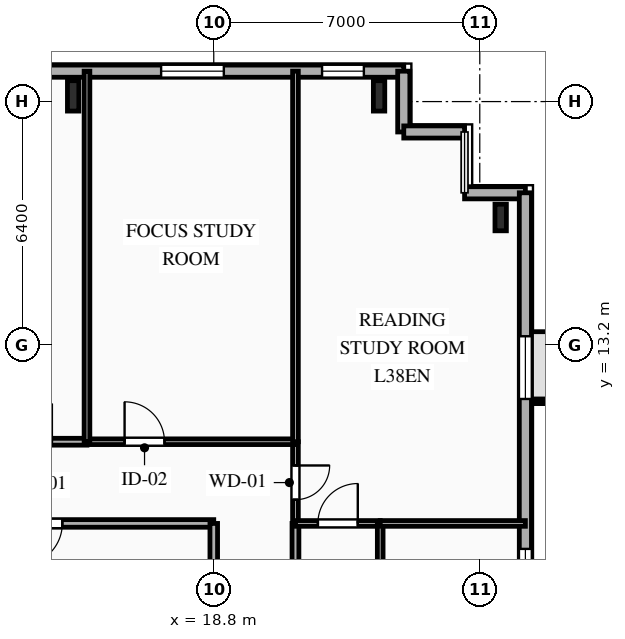
"""IFC4 building model, lengths in metres.
Left out: names, types, materials, properties, quantities, classifications, styles, units other than length and angle.
Written with IfcOpenShell. Run it as: python <this file> out.ifc"""

import sys

from ifc_helpers import new_model, si_unit, direction, frame, frame_2d, origin, origin_2d, place, context, subcontext, project, spatial, rectangle, i_section, extrude, element, fill, save


model = new_model("IFC4")
c1 = context("Model", 3, precision=1e-05, world=origin(), true_north=direction((0.0, 1.0)))
c2 = subcontext(c1, "Body", "Model", "MODEL_VIEW")
j1 = project(units=[si_unit("LENGTHUNIT", "METRE"), si_unit("PLANEANGLEUNIT", "RADIAN")], contexts=[c1])
p1 = place(None, origin())
s1 = spatial("IfcSite", under=j1, at=p1, CompositionType="ELEMENT")
p2 = place(p1, origin())
s2 = spatial("IfcBuilding", under=s1, at=p2, CompositionType="ELEMENT")
p3 = place(p2, frame((0.0, 0.0, 137.7)))
s3 = spatial("IfcBuildingStorey", under=s2, at=p3, CompositionType="ELEMENT", Elevation=137.7)
for number, where, z_axis, x_axis in (
    (1, (23.15, 19.75, 0.0), (0.0, 0.0, 1.0), (1.0, 0.0, 0.0)),
    (2, (15.1, 19.75, 0.0), (0.0, 0.0, 1.0), (1.0, 0.0, 0.0)),
):
    element("IfcColumn", number, at=place(p3, frame(where, z_axis=z_axis, x_axis=x_axis)), inside=s3, PredefinedType="COLUMN", context=c2, shape_type="SweptSolid", body=[
        extrude(i_section(OverallWidth=0.3, OverallDepth=0.8, WebThickness=0.018, FlangeThickness=0.033, FilletRadius=0.03, at=origin_2d()), origin(), (0.0, 0.0, 1.0), 3.35),
    ])
p4 = place(p3, frame((26.35, 16.55, 0.0), z_axis=(0.0, 0.0, 1.0), x_axis=(1.0, 0.0, 0.0)))
e3 = element("IfcColumn", 3, at=p4, inside=s3, PredefinedType="COLUMN", context=c2, shape_type="SweptSolid", body=[
    extrude(i_section(OverallWidth=0.3, OverallDepth=0.7, WebThickness=0.017, FlangeThickness=0.032, FilletRadius=0.027, at=origin_2d()), origin(), (0.0, 0.0, 1.0), 3.35),
])
p5 = place(p3, frame((-25.8, 20.4, 0.0), z_axis=(0.0, 0.0, 1.0), x_axis=(1.0, 0.0, 0.0)))
e4 = element("IfcWall", 4, at=p5, inside=s3, PredefinedType="SOLIDWALL", context=c2, shape_type="SweptSolid", body=[
    extrude(rectangle(XDim=49.6, YDim=0.32, at=frame_2d((24.8, 0.0))), origin(), (0.0, 0.0, 1.0), 3.04),
])
p6 = place(p5, frame((2.135, 0.0, 0.85)))
e5 = element("IfcOpeningElement", 5, at=p6, cuts=e4, PredefinedType="OPENING", context=c2, shape_type="SweptSolid", body=[
    extrude(rectangle(XDim=1.65, YDim=1.85, at=frame_2d((0.825, 0.925))), frame((0.0, 0.17, 0.0), z_axis=(0.0, -1.0, 0.0), x_axis=(1.0, 0.0, 0.0)), (0.0, 0.0, 1.0), 0.34),
])
p7 = place(p5, frame((6.706, 0.0, 0.85)))
e6 = element("IfcOpeningElement", 6, at=p7, cuts=e4, PredefinedType="OPENING", context=c2, shape_type="SweptSolid", body=[
    extrude(rectangle(XDim=1.65, YDim=1.85, at=frame_2d((0.825, 0.925))), frame((0.0, 0.17, 0.0), z_axis=(0.0, -1.0, 0.0), x_axis=(1.0, 0.0, 0.0)), (0.0, 0.0, 1.0), 0.34),
])
p8 = place(p5, frame((14.81, 0.0, 0.85)))
e7 = element("IfcOpeningElement", 7, at=p8, cuts=e4, PredefinedType="OPENING", context=c2, shape_type="SweptSolid", body=[
    extrude(rectangle(XDim=1.5, YDim=1.85, at=frame_2d((0.75, 0.925))), frame((0.0, 0.17, 0.0), z_axis=(0.0, -1.0, 0.0), x_axis=(1.0, 0.0, 0.0)), (0.0, 0.0, 1.0), 0.34),
])
p9 = place(p5, frame((19.26, 0.0, 0.85)))
e8 = element("IfcOpeningElement", 8, at=p9, cuts=e4, PredefinedType="OPENING", context=c2, shape_type="SweptSolid", body=[
    extrude(rectangle(XDim=2.2, YDim=1.85, at=frame_2d((1.1, 0.925))), frame((0.0, 0.17, 0.0), z_axis=(0.0, -1.0, 0.0), x_axis=(1.0, 0.0, 0.0)), (0.0, 0.0, 1.0), 0.34),
])
p10 = place(p5, frame((25.26, 0.0, 0.85)))
e9 = element("IfcOpeningElement", 9, at=p10, cuts=e4, PredefinedType="OPENING", context=c2, shape_type="SweptSolid", body=[
    extrude(rectangle(XDim=2.2, YDim=1.85, at=frame_2d((1.1, 0.925))), frame((0.0, 0.17, 0.0), z_axis=(0.0, -1.0, 0.0), x_axis=(1.0, 0.0, 0.0)), (0.0, 0.0, 1.0), 0.34),
])
p11 = place(p5, frame((30.4, 0.0, 0.85)))
e10 = element("IfcOpeningElement", 10, at=p11, cuts=e4, PredefinedType="OPENING", context=c2, shape_type="SweptSolid", body=[
    extrude(rectangle(XDim=2.2, YDim=1.85, at=frame_2d((1.1, 0.925))), frame((0.0, 0.17, 0.0), z_axis=(0.0, -1.0, 0.0), x_axis=(1.0, 0.0, 0.0)), (0.0, 0.0, 1.0), 0.34),
])
p12 = place(p5, frame((37.18, 0.0, 0.85)))
e11 = element("IfcOpeningElement", 11, at=p12, cuts=e4, PredefinedType="OPENING", context=c2, shape_type="SweptSolid", body=[
    extrude(rectangle(XDim=2.2, YDim=1.85, at=frame_2d((1.1, 0.925))), frame((0.0, 0.17, 0.0), z_axis=(0.0, -1.0, 0.0), x_axis=(1.0, 0.0, 0.0)), (0.0, 0.0, 1.0), 0.34),
])
p13 = place(p5, frame((43.215, 0.0, 0.85)))
e12 = element("IfcOpeningElement", 12, at=p13, cuts=e4, PredefinedType="OPENING", context=c2, shape_type="SweptSolid", body=[
    extrude(rectangle(XDim=1.65, YDim=1.85, at=frame_2d((0.825, 0.925))), frame((0.0, 0.17, 0.0), z_axis=(0.0, -1.0, 0.0), x_axis=(1.0, 0.0, 0.0)), (0.0, 0.0, 1.0), 0.34),
])
p14 = place(p5, frame((47.45, 0.0, 0.85)))
e13 = element("IfcOpeningElement", 13, at=p14, cuts=e4, PredefinedType="OPENING", context=c2, shape_type="SweptSolid", body=[
    extrude(rectangle(XDim=1.1, YDim=1.85, at=frame_2d((0.55, 0.925))), frame((0.0, 0.17, 0.0), z_axis=(0.0, -1.0, 0.0), x_axis=(1.0, 0.0, 0.0)), (0.0, 0.0, 1.0), 0.34),
])
for number, where, z_axis, x_axis in (
    (14, (23.8, 20.4, 0.0), (0.0, 0.0, 1.0), (0.0, -1.0, 0.0)),
    (15, (23.8, 18.8, 0.0), (0.0, 0.0, 1.0), (1.0, 0.0, 0.0)),
):
    element("IfcWall", number, at=place(p3, frame(where, z_axis=z_axis, x_axis=x_axis)), inside=s3, PredefinedType="SOLIDWALL", context=c2, shape_type="SweptSolid", body=[
        extrude(rectangle(XDim=1.6, YDim=0.32, at=frame_2d((0.8, 0.0))), origin(), (0.0, 0.0, 1.0), 3.04),
    ])
p15 = place(p3, frame((25.4, 17.2, 0.0), z_axis=(0.0, 0.0, 1.0), x_axis=(1.0, 0.0, 0.0)))
e16 = element("IfcWall", 16, at=p15, inside=s3, PredefinedType="SOLIDWALL", context=c2, shape_type="SweptSolid", body=[
    extrude(rectangle(XDim=1.6, YDim=0.32, at=frame_2d((0.8, 0.0))), origin(), (0.0, 0.0, 1.0), 3.04),
])
p16 = place(p3, frame((27.0, 17.2, 0.0), z_axis=(0.0, 0.0, 1.0), x_axis=(0.0, -1.0, 0.0)))
e17 = element("IfcWall", 17, at=p16, inside=s3, PredefinedType="SOLIDWALL", context=c2, shape_type="SweptSolid", body=[
    extrude(rectangle(XDim=29.6, YDim=0.32, at=frame_2d((14.8, 0.0))), origin(), (0.0, 0.0, 1.0), 3.04),
])
p17 = place(p16, frame((3.775, 0.0, 0.85)))
e18 = element("IfcOpeningElement", 18, at=p17, cuts=e17, PredefinedType="OPENING", context=c2, shape_type="SweptSolid", body=[
    extrude(rectangle(XDim=1.65, YDim=1.85, at=frame_2d((0.825, 0.925))), frame((0.0, 0.17, 0.0), z_axis=(0.0, -1.0, 0.0), x_axis=(1.0, 0.0, 0.0)), (0.0, 0.0, 1.0), 0.34),
])
p18 = place(p16, frame((9.37, 0.0, 0.85)))
e19 = element("IfcOpeningElement", 19, at=p18, cuts=e17, PredefinedType="OPENING", context=c2, shape_type="SweptSolid", body=[
    extrude(rectangle(XDim=1.5, YDim=1.85, at=frame_2d((0.75, 0.925))), frame((0.0, 0.17, 0.0), z_axis=(0.0, -1.0, 0.0), x_axis=(1.0, 0.0, 0.0)), (0.0, 0.0, 1.0), 0.34),
])
p19 = place(p16, frame((12.25, 0.0, 0.85)))
e20 = element("IfcOpeningElement", 20, at=p19, cuts=e17, PredefinedType="OPENING", context=c2, shape_type="SweptSolid", body=[
    extrude(rectangle(XDim=1.5, YDim=1.85, at=frame_2d((0.75, 0.925))), frame((0.0, 0.17, 0.0), z_axis=(0.0, -1.0, 0.0), x_axis=(1.0, 0.0, 0.0)), (0.0, 0.0, 1.0), 0.34),
])
p20 = place(p16, frame((15.05, 0.0, 0.85)))
e21 = element("IfcOpeningElement", 21, at=p20, cuts=e17, PredefinedType="OPENING", context=c2, shape_type="SweptSolid", body=[
    extrude(rectangle(XDim=1.5, YDim=1.85, at=frame_2d((0.75, 0.925))), frame((0.0, 0.17, 0.0), z_axis=(0.0, -1.0, 0.0), x_axis=(1.0, 0.0, 0.0)), (0.0, 0.0, 1.0), 0.34),
])
p21 = place(p16, frame((17.865, 0.0, 0.85)))
e22 = element("IfcOpeningElement", 22, at=p21, cuts=e17, PredefinedType="OPENING", context=c2, shape_type="SweptSolid", body=[
    extrude(rectangle(XDim=1.95, YDim=1.85, at=frame_2d((0.975, 0.925))), frame((0.0, 0.17, 0.0), z_axis=(0.0, -1.0, 0.0), x_axis=(1.0, 0.0, 0.0)), (0.0, 0.0, 1.0), 0.34),
])
p22 = place(p16, frame((25.175, 0.0, 0.85)))
e23 = element("IfcOpeningElement", 23, at=p22, cuts=e17, PredefinedType="OPENING", context=c2, shape_type="SweptSolid", body=[
    extrude(rectangle(XDim=1.65, YDim=1.85, at=frame_2d((0.825, 0.925))), frame((0.0, 0.17, 0.0), z_axis=(0.0, -1.0, 0.0), x_axis=(1.0, 0.0, 0.0)), (0.0, 0.0, 1.0), 0.34),
])
p23 = place(p3, frame((18.8, 8.5, 0.0), z_axis=(0.0, 0.0, 1.0), x_axis=(-1.0, 0.0, 0.0)))
e24 = element("IfcWall", 24, at=p23, inside=s3, PredefinedType="PARTITIONING", context=c2, shape_type="SweptSolid", body=[
    extrude(rectangle(XDim=6.8, YDim=0.2, at=frame_2d((3.4, 0.0))), origin(), (0.0, 0.0, 1.0), 3.04),
])
p24 = place(p23, frame((3.985, 0.0, 0.0)))
e25 = element("IfcOpeningElement", 25, at=p24, cuts=e24, PredefinedType="OPENING", context=c2, shape_type="SweptSolid", body=[
    extrude(rectangle(XDim=1.1, YDim=2.15, at=frame_2d((0.55, 1.075))), frame((0.0, 0.11, 0.0), z_axis=(0.0, -1.0, 0.0), x_axis=(1.0, 0.0, 0.0)), (0.0, 0.0, 1.0), 0.22),
])
p25 = place(p3, frame((18.8, 5.6, 0.0), z_axis=(0.0, 0.0, 1.0), x_axis=(0.0, 1.0, 0.0)))
e26 = element("IfcWall", 26, at=p25, inside=s3, PredefinedType="PARTITIONING", context=c2, shape_type="SweptSolid", body=[
    extrude(rectangle(XDim=2.9, YDim=0.2, at=frame_2d((1.45, 0.0))), origin(), (0.0, 0.0, 1.0), 2.525),
])
p26 = place(p3, frame((20.95, 10.65, 0.0), z_axis=(0.0, 0.0, 1.0), x_axis=(0.0, -1.0, 0.0)))
e27 = element("IfcWall", 27, at=p26, inside=s3, PredefinedType="PARTITIONING", context=c2, shape_type="SweptSolid", body=[
    extrude(rectangle(XDim=2.15, YDim=0.15, at=frame_2d((1.075, 0.0))), origin(), (0.0, 0.0, 1.0), 3.04),
])
p27 = place(p26, frame((0.625, 0.0, 0.0)))
e28 = element("IfcOpeningElement", 28, at=p27, cuts=e27, PredefinedType="OPENING", context=c2, shape_type="SweptSolid", body=[
    extrude(rectangle(XDim=0.9, YDim=2.1, at=frame_2d((0.45, 1.05))), frame((0.0, 0.085, 0.0), z_axis=(0.0, -1.0, 0.0), x_axis=(1.0, 0.0, 0.0)), (0.0, 0.0, 1.0), 0.17),
])
p28 = place(p3, frame((11.929, 10.65, 0.0), z_axis=(0.0, 0.0, 1.0), x_axis=(1.0, 0.0, 0.0)))
e29 = element("IfcWall", 29, at=p28, inside=s3, PredefinedType="PARTITIONING", context=c2, shape_type="SweptSolid", body=[
    extrude(rectangle(XDim=3.535, YDim=0.18, at=frame_2d((1.768, 0.0))), origin(), (0.0, 0.0, 1.0), 3.04),
])
p29 = place(p28, frame((1.611, 0.0, 0.0)))
e30 = element("IfcOpeningElement", 30, at=p29, cuts=e29, PredefinedType="OPENING", context=c2, shape_type="SweptSolid", body=[
    extrude(rectangle(XDim=1.0, YDim=2.15, at=frame_2d((0.5, 1.075))), frame((0.0, 0.1, 0.0), z_axis=(0.0, -1.0, 0.0), x_axis=(1.0, 0.0, 0.0)), (0.0, 0.0, 1.0), 0.2),
])
p30 = place(p3, frame((15.464, 10.65, 0.0), z_axis=(0.0, 0.0, 1.0), x_axis=(1.0, 0.0, 0.0)))
e31 = element("IfcWall", 31, at=p30, inside=s3, PredefinedType="PARTITIONING", context=c2, shape_type="SweptSolid", body=[
    extrude(rectangle(XDim=5.486, YDim=0.15, at=frame_2d((2.743, 0.0))), origin(), (0.0, 0.0, 1.0), 3.04),
])
p31 = place(p30, frame((0.99, 0.0, 0.0)))
e32 = element("IfcOpeningElement", 32, at=p31, cuts=e31, PredefinedType="OPENING", context=c2, shape_type="SweptSolid", body=[
    extrude(rectangle(XDim=1.05, YDim=2.15, at=frame_2d((0.525, 1.075))), frame((0.0, 0.085, 0.0), z_axis=(0.0, -1.0, 0.0), x_axis=(1.0, 0.0, 0.0)), (0.0, 0.0, 1.0), 0.17),
])
p32 = place(p3, frame((20.95, 8.5, 0.0), z_axis=(0.0, 0.0, 1.0), x_axis=(0.0, -1.0, 0.0)))
e33 = element("IfcWall", 33, at=p32, inside=s3, PredefinedType="PARTITIONING", context=c2, shape_type="SweptSolid", body=[
    extrude(rectangle(XDim=14.1, YDim=0.18, at=frame_2d((7.05, 0.0))), origin(), (0.0, 0.0, 1.0), 3.04),
])
p33 = place(p32, frame((8.042, 0.0, 0.0)))
e34 = element("IfcOpeningElement", 34, at=p33, cuts=e33, PredefinedType="OPENING", context=c2, shape_type="SweptSolid", body=[
    extrude(rectangle(XDim=1.0, YDim=2.15, at=frame_2d((0.5, 1.075))), frame((0.0, 0.1, 0.0), z_axis=(0.0, -1.0, 0.0), x_axis=(1.0, 0.0, 0.0)), (0.0, 0.0, 1.0), 0.2),
])
p34 = place(p3, frame((20.95, 8.5, 0.0), z_axis=(0.0, 0.0, 1.0), x_axis=(1.0, 0.0, 0.0)))
e35 = element("IfcWall", 35, at=p34, inside=s3, PredefinedType="PARTITIONING", context=c2, shape_type="SweptSolid", body=[
    extrude(rectangle(XDim=2.23, YDim=0.15, at=frame_2d((1.115, 0.0))), origin(), (0.0, 0.0, 1.0), 3.04),
])
p35 = place(p34, frame((0.59, 0.0, 0.0)))
e36 = element("IfcOpeningElement", 36, at=p35, cuts=e35, PredefinedType="OPENING", context=c2, shape_type="SweptSolid", body=[
    extrude(rectangle(XDim=1.05, YDim=2.15, at=frame_2d((0.525, 1.075))), frame((0.0, 0.085, 0.0), z_axis=(0.0, -1.0, 0.0), x_axis=(1.0, 0.0, 0.0)), (0.0, 0.0, 1.0), 0.17),
])
p36 = place(p3, frame((23.18, 8.5, 0.0), z_axis=(0.0, 0.0, 1.0), x_axis=(0.0, -1.0, 0.0)))
e37 = element("IfcWall", 37, at=p36, inside=s3, PredefinedType="PARTITIONING", context=c2, shape_type="SweptSolid", body=[
    extrude(rectangle(XDim=2.82, YDim=0.15, at=frame_2d((1.41, 0.0))), origin(), (0.0, 0.0, 1.0), 3.04),
])
p37 = place(p36, frame((1.201, 0.0, 0.0)))
e38 = element("IfcOpeningElement", 38, at=p37, cuts=e37, PredefinedType="OPENING", context=c2, shape_type="SweptSolid", body=[
    extrude(rectangle(XDim=0.95, YDim=2.1, at=frame_2d((0.475, 1.05))), frame((0.0, 0.085, 0.0), z_axis=(0.0, -1.0, 0.0), x_axis=(1.0, 0.0, 0.0)), (0.0, 0.0, 1.0), 0.17),
])
p38 = place(p3, frame((27.0, 8.5, 0.0), z_axis=(0.0, 0.0, 1.0), x_axis=(-1.0, 0.0, 0.0)))
e39 = element("IfcWall", 39, at=p38, inside=s3, PredefinedType="PARTITIONING", context=c2, shape_type="SweptSolid", body=[
    extrude(rectangle(XDim=3.82, YDim=0.15, at=frame_2d((1.91, 0.0))), origin(), (0.0, 0.0, 1.0), 3.04),
])
for number, where, z_axis, x_axis in (
    (40, (20.95, 10.65, 0.0), (0.0, 0.0, 1.0), (0.0, 1.0, 0.0)),
    (41, (15.464, 20.4, 0.0), (0.0, 0.0, 1.0), (0.0, -1.0, 0.0)),
):
    element("IfcWall", number, at=place(p3, frame(where, z_axis=z_axis, x_axis=x_axis)), inside=s3, PredefinedType="PARTITIONING", context=c2, shape_type="SweptSolid", body=[
        extrude(rectangle(XDim=9.75, YDim=0.15, at=frame_2d((4.875, 0.0))), origin(), (0.0, 0.0, 1.0), 2.525),
    ])
p39 = place(p13, origin())
e42 = element("IfcWindow", 42, at=p39, inside=s3, PartitioningType="SINGLE_PANEL", PredefinedType="WINDOW", context=c2, shape_type="SweptSolid", body=[
    extrude(rectangle(XDim=1.65, YDim=1.85, at=frame_2d((0.825, 0.925))), frame((0.0, 0.03, 0.0), z_axis=(0.0, -1.0, 0.0), x_axis=(1.0, 0.0, 0.0)), (0.0, 0.0, 1.0), 0.06),
])
fill(e12, e42)
p40 = place(p14, origin())
e43 = element("IfcWindow", 43, at=p40, inside=s3, PartitioningType="SINGLE_PANEL", PredefinedType="WINDOW", context=c2, shape_type="SweptSolid", body=[
    extrude(rectangle(XDim=1.1, YDim=1.85, at=frame_2d((0.55, 0.925))), frame((0.0, 0.03, 0.0), z_axis=(0.0, -1.0, 0.0), x_axis=(1.0, 0.0, 0.0)), (0.0, 0.0, 1.0), 0.06),
])
fill(e13, e43)
p41 = place(p17, origin())
e44 = element("IfcWindow", 44, at=p41, inside=s3, PartitioningType="SINGLE_PANEL", PredefinedType="WINDOW", context=c2, shape_type="SweptSolid", body=[
    extrude(rectangle(XDim=1.65, YDim=1.85, at=frame_2d((0.825, 0.925))), frame((0.0, 0.03, 0.0), z_axis=(0.0, -1.0, 0.0), x_axis=(1.0, 0.0, 0.0)), (0.0, 0.0, 1.0), 0.06),
])
fill(e18, e44)
p42 = place(p18, origin())
e45 = element("IfcWindow", 45, at=p42, inside=s3, PartitioningType="SINGLE_PANEL", PredefinedType="WINDOW", context=c2, shape_type="SweptSolid", body=[
    extrude(rectangle(XDim=1.5, YDim=1.85, at=frame_2d((0.75, 0.925))), frame((0.0, 0.03, 0.0), z_axis=(0.0, -1.0, 0.0), x_axis=(1.0, 0.0, 0.0)), (0.0, 0.0, 1.0), 0.06),
])
fill(e19, e45)
p43 = place(p24, origin())
e46 = element("IfcDoor", 46, at=p43, inside=s3, OperationType="SINGLE_SWING_RIGHT", PredefinedType="DOOR", context=c2, shape_type="SweptSolid", body=[
    extrude(rectangle(XDim=1.1, YDim=2.15, at=frame_2d((0.55, 1.075))), frame((0.0, 0.025, 0.0), z_axis=(0.0, -1.0, 0.0), x_axis=(1.0, 0.0, 0.0)), (0.0, 0.0, 1.0), 0.05),
])
fill(e25, e46)
p44 = place(p27, origin())
e47 = element("IfcDoor", 47, at=p44, inside=s3, OperationType="SINGLE_SWING_LEFT", PredefinedType="DOOR", context=c2, shape_type="SweptSolid", body=[
    extrude(rectangle(XDim=0.9, YDim=2.1, at=frame_2d((0.45, 1.05))), frame((0.0, 0.025, 0.0), z_axis=(0.0, -1.0, 0.0), x_axis=(1.0, 0.0, 0.0)), (0.0, 0.0, 1.0), 0.05),
])
fill(e28, e47)
p45 = place(p29, origin())
e48 = element("IfcDoor", 48, at=p45, inside=s3, OperationType="SINGLE_SWING_RIGHT", PredefinedType="DOOR", context=c2, shape_type="SweptSolid", body=[
    extrude(rectangle(XDim=1.0, YDim=2.15, at=frame_2d((0.5, 1.075))), frame((0.0, 0.025, 0.0), z_axis=(0.0, -1.0, 0.0), x_axis=(1.0, 0.0, 0.0)), (0.0, 0.0, 1.0), 0.05),
])
fill(e30, e48)
p46 = place(p31, origin())
e49 = element("IfcDoor", 49, at=p46, inside=s3, OperationType="SINGLE_SWING_LEFT", PredefinedType="DOOR", context=c2, shape_type="SweptSolid", body=[
    extrude(rectangle(XDim=1.05, YDim=2.15, at=frame_2d((0.525, 1.075))), frame((0.0, 0.025, 0.0), z_axis=(0.0, -1.0, 0.0), x_axis=(1.0, 0.0, 0.0)), (0.0, 0.0, 1.0), 0.05),
])
fill(e32, e49)
p47 = place(p35, origin())
e50 = element("IfcDoor", 50, at=p47, inside=s3, OperationType="SINGLE_SWING_RIGHT", PredefinedType="DOOR", context=c2, shape_type="SweptSolid", body=[
    extrude(rectangle(XDim=1.05, YDim=2.15, at=frame_2d((0.525, 1.075))), frame((0.0, 0.025, 0.0), z_axis=(0.0, -1.0, 0.0), x_axis=(1.0, 0.0, 0.0)), (0.0, 0.0, 1.0), 0.05),
])
fill(e36, e50)
save(model, sys.argv[1])
